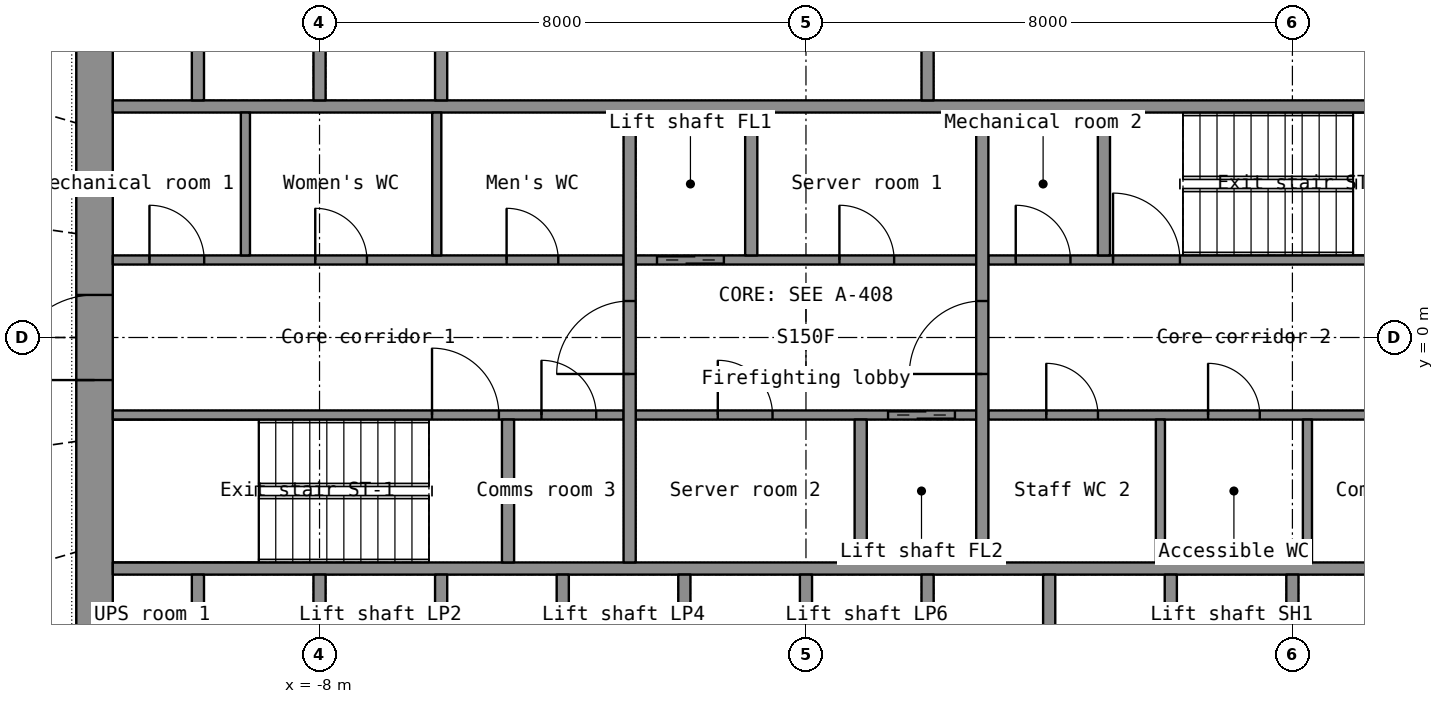
"""IFC4 building model, lengths in metres.
Left out: names, types, materials, properties, quantities, classifications, styles, units other than length and angle.
Written with IfcOpenShell. Run it as: python <this file> out.ifc"""

import sys

from ifc_helpers import new_model, si_unit, direction, frame, frame_2d, origin, place, context, subcontext, project, spatial, rectangle, extrude, element, fill, save


model = new_model("IFC4")
c1 = context("Model", 3, precision=1e-05, world=origin(), true_north=direction((0.0, 1.0)))
c2 = subcontext(c1, "Body", "Model", "MODEL_VIEW")
j1 = project(units=[si_unit("LENGTHUNIT", "METRE"), si_unit("PLANEANGLEUNIT", "RADIAN")], contexts=[c1])
p1 = place(None, origin())
s1 = spatial("IfcSite", under=j1, at=p1, CompositionType="ELEMENT")
p2 = place(p1, origin())
s2 = spatial("IfcBuilding", under=s1, at=p2, CompositionType="ELEMENT")
p3 = place(p2, frame((0.0, 0.0, 40.8)))
s3 = spatial("IfcBuildingStorey", under=s2, at=p3, CompositionType="ELEMENT", Elevation=40.8)
p4 = place(p3, frame((-11.7, -7.2, 0.0), z_axis=(0.0, 0.0, 1.0), x_axis=(0.0, 1.0, 0.0)))
e1 = element("IfcWall", 1, at=p4, inside=s3, PredefinedType="SHEAR", context=c2, shape_type="SweptSolid", body=[
    extrude(rectangle(XDim=14.4, YDim=0.6, at=frame_2d((7.2, 0.0))), origin(), (0.0, 0.0, 1.0), 3.3),
])
p5 = place(p4, frame((6.5, 0.0, 0.0)))
e2 = element("IfcOpeningElement", 2, at=p5, cuts=e1, PredefinedType="OPENING", context=c2, shape_type="SweptSolid", body=[
    extrude(rectangle(XDim=1.4, YDim=2.2, at=frame_2d((0.7, 1.1))), frame((0.0, 0.31, 0.0), z_axis=(0.0, -1.0, 0.0), x_axis=(1.0, 0.0, 0.0)), (0.0, 0.0, 1.0), 0.62),
])
for number, where, z_axis, x_axis in (
    (3, (-11.4, -3.8, 0.0), (0.0, 0.0, 1.0), (1.0, 0.0, 0.0)),
    (4, (-11.4, 3.8, 0.0), (0.0, 0.0, 1.0), (1.0, 0.0, 0.0)),
):
    element("IfcWall", number, at=place(p3, frame(where, z_axis=z_axis, x_axis=x_axis)), inside=s3, PredefinedType="SHEAR", context=c2, shape_type="SweptSolid", body=[
        extrude(rectangle(XDim=22.8, YDim=0.2, at=frame_2d((11.4, 0.0))), origin(), (0.0, 0.0, 1.0), 3.3),
    ])
for number, where, z_axis, x_axis in (
    (5, (-10.0, -6.6, 0.0), (0.0, 0.0, 1.0), (0.0, 1.0, 0.0)),
    (6, (-8.0, -6.6, 0.0), (0.0, 0.0, 1.0), (0.0, 1.0, 0.0)),
    (7, (-6.0, -6.6, 0.0), (0.0, 0.0, 1.0), (0.0, 1.0, 0.0)),
    (8, (-4.0, -6.6, 0.0), (0.0, 0.0, 1.0), (0.0, 1.0, 0.0)),
    (9, (-2.0, -6.6, 0.0), (0.0, 0.0, 1.0), (0.0, 1.0, 0.0)),
    (10, (0.0, -6.6, 0.0), (0.0, 0.0, 1.0), (0.0, 1.0, 0.0)),
    (11, (2.0, -6.6, 0.0), (0.0, 0.0, 1.0), (0.0, 1.0, 0.0)),
    (12, (4.0, -6.6, 0.0), (0.0, 0.0, 1.0), (0.0, 1.0, 0.0)),
    (13, (6.0, -6.6, 0.0), (0.0, 0.0, 1.0), (0.0, 1.0, 0.0)),
    (14, (8.0, -6.6, 0.0), (0.0, 0.0, 1.0), (0.0, 1.0, 0.0)),
    (15, (-10.0, 3.9, 0.0), (0.0, 0.0, 1.0), (0.0, 1.0, 0.0)),
    (16, (-8.0, 3.9, 0.0), (0.0, 0.0, 1.0), (0.0, 1.0, 0.0)),
    (17, (-6.0, 3.9, 0.0), (0.0, 0.0, 1.0), (0.0, 1.0, 0.0)),
):
    element("IfcWall", number, at=place(p3, frame(where, z_axis=z_axis, x_axis=x_axis)), inside=s3, PredefinedType="SHEAR", context=c2, shape_type="SweptSolid", body=[
        extrude(rectangle(XDim=2.7, YDim=0.2, at=frame_2d((1.35, 0.0))), origin(), (0.0, 0.0, 1.0), 3.3),
    ])
p6 = place(p3, frame((2.0, 3.9, 0.0), z_axis=(0.0, 0.0, 1.0), x_axis=(0.0, 1.0, 0.0)))
e18 = element("IfcWall", 18, at=p6, inside=s3, PredefinedType="PARTITIONING", context=c2, shape_type="SweptSolid", body=[
    extrude(rectangle(XDim=2.7, YDim=0.2, at=frame_2d((1.35, 0.0))), origin(), (0.0, 0.0, 1.0), 3.3),
])
p7 = place(p3, frame((-11.4, -1.275, 0.0), z_axis=(0.0, 0.0, 1.0), x_axis=(1.0, 0.0, 0.0)))
e19 = element("IfcWall", 19, at=p7, inside=s3, PredefinedType="SHEAR", context=c2, shape_type="SweptSolid", body=[
    extrude(rectangle(XDim=8.4, YDim=0.15, at=frame_2d((4.2, 0.0))), origin(), (0.0, 0.0, 1.0), 3.3),
])
p8 = place(p7, frame((5.25, 0.0, 0.0)))
e20 = element("IfcOpeningElement", 20, at=p8, cuts=e19, PredefinedType="OPENING", context=c2, shape_type="SweptSolid", body=[
    extrude(rectangle(XDim=1.1, YDim=2.15, at=frame_2d((0.55, 1.075))), frame((0.0, 0.085, 0.0), z_axis=(0.0, -1.0, 0.0), x_axis=(1.0, 0.0, 0.0)), (0.0, 0.0, 1.0), 0.17),
])
p9 = place(p7, frame((7.05, 0.0, 0.0)))
e21 = element("IfcOpeningElement", 21, at=p9, cuts=e19, PredefinedType="OPENING", context=c2, shape_type="SweptSolid", body=[
    extrude(rectangle(XDim=0.9, YDim=2.1, at=frame_2d((0.45, 1.05))), frame((0.0, 0.085, 0.0), z_axis=(0.0, -1.0, 0.0), x_axis=(1.0, 0.0, 0.0)), (0.0, 0.0, 1.0), 0.17),
])
p10 = place(p3, frame((-2.8, -1.275, 0.0), z_axis=(0.0, 0.0, 1.0), x_axis=(1.0, 0.0, 0.0)))
e22 = element("IfcWall", 22, at=p10, inside=s3, PredefinedType="SHEAR", context=c2, shape_type="SweptSolid", body=[
    extrude(rectangle(XDim=5.6, YDim=0.15, at=frame_2d((2.8, 0.0))), origin(), (0.0, 0.0, 1.0), 3.3),
])
p11 = place(p10, frame((4.15, 0.0, 0.0)))
e23 = element("IfcOpeningElement", 23, at=p11, cuts=e22, PredefinedType="OPENING", context=c2, shape_type="SweptSolid", body=[
    extrude(rectangle(XDim=1.1, YDim=2.2, at=frame_2d((0.55, 1.1))), frame((0.0, 0.085, 0.0), z_axis=(0.0, -1.0, 0.0), x_axis=(1.0, 0.0, 0.0)), (0.0, 0.0, 1.0), 0.17),
])
p12 = place(p10, frame((1.35, 0.0, 0.0)))
e24 = element("IfcOpeningElement", 24, at=p12, cuts=e22, PredefinedType="OPENING", context=c2, shape_type="SweptSolid", body=[
    extrude(rectangle(XDim=0.9, YDim=2.1, at=frame_2d((0.45, 1.05))), frame((0.0, 0.085, 0.0), z_axis=(0.0, -1.0, 0.0), x_axis=(1.0, 0.0, 0.0)), (0.0, 0.0, 1.0), 0.17),
])
p13 = place(p3, frame((3.0, -1.275, 0.0), z_axis=(0.0, 0.0, 1.0), x_axis=(1.0, 0.0, 0.0)))
e25 = element("IfcWall", 25, at=p13, inside=s3, PredefinedType="PARTITIONING", context=c2, shape_type="SweptSolid", body=[
    extrude(rectangle(XDim=8.4, YDim=0.15, at=frame_2d((4.2, 0.0))), origin(), (0.0, 0.0, 1.0), 3.3),
])
p14 = place(p13, frame((0.952, 0.0, 0.0)))
e26 = element("IfcOpeningElement", 26, at=p14, cuts=e25, PredefinedType="OPENING", context=c2, shape_type="SweptSolid", body=[
    extrude(rectangle(XDim=0.85, YDim=2.1, at=frame_2d((0.425, 1.05))), frame((0.0, 0.085, 0.0), z_axis=(0.0, -1.0, 0.0), x_axis=(1.0, 0.0, 0.0)), (0.0, 0.0, 1.0), 0.17),
])
p15 = place(p13, frame((3.613, 0.0, 0.0)))
e27 = element("IfcOpeningElement", 27, at=p15, cuts=e25, PredefinedType="OPENING", context=c2, shape_type="SweptSolid", body=[
    extrude(rectangle(XDim=0.85, YDim=2.1, at=frame_2d((0.425, 1.05))), frame((0.0, 0.085, 0.0), z_axis=(0.0, -1.0, 0.0), x_axis=(1.0, 0.0, 0.0)), (0.0, 0.0, 1.0), 0.17),
])
p16 = place(p13, frame((6.411, 0.0, 0.0)))
e28 = element("IfcOpeningElement", 28, at=p16, cuts=e25, PredefinedType="OPENING", context=c2, shape_type="SweptSolid", body=[
    extrude(rectangle(XDim=0.9, YDim=2.1, at=frame_2d((0.45, 1.05))), frame((0.0, 0.085, 0.0), z_axis=(0.0, -1.0, 0.0), x_axis=(1.0, 0.0, 0.0)), (0.0, 0.0, 1.0), 0.17),
])
p17 = place(p3, frame((-11.4, 1.275, 0.0), z_axis=(0.0, 0.0, 1.0), x_axis=(1.0, 0.0, 0.0)))
e29 = element("IfcWall", 29, at=p17, inside=s3, PredefinedType="PARTITIONING", context=c2, shape_type="SweptSolid", body=[
    extrude(rectangle(XDim=8.4, YDim=0.15, at=frame_2d((4.2, 0.0))), origin(), (0.0, 0.0, 1.0), 3.3),
])
p18 = place(p17, frame((0.603, 0.0, 0.0)))
e30 = element("IfcOpeningElement", 30, at=p18, cuts=e29, PredefinedType="OPENING", context=c2, shape_type="SweptSolid", body=[
    extrude(rectangle(XDim=0.9, YDim=2.1, at=frame_2d((0.45, 1.05))), frame((0.0, 0.085, 0.0), z_axis=(0.0, -1.0, 0.0), x_axis=(1.0, 0.0, 0.0)), (0.0, 0.0, 1.0), 0.17),
])
p19 = place(p17, frame((3.33, 0.0, 0.0)))
e31 = element("IfcOpeningElement", 31, at=p19, cuts=e29, PredefinedType="OPENING", context=c2, shape_type="SweptSolid", body=[
    extrude(rectangle(XDim=0.85, YDim=2.1, at=frame_2d((0.425, 1.05))), frame((0.0, 0.085, 0.0), z_axis=(0.0, -1.0, 0.0), x_axis=(1.0, 0.0, 0.0)), (0.0, 0.0, 1.0), 0.17),
])
p20 = place(p17, frame((6.477, 0.0, 0.0)))
e32 = element("IfcOpeningElement", 32, at=p20, cuts=e29, PredefinedType="OPENING", context=c2, shape_type="SweptSolid", body=[
    extrude(rectangle(XDim=0.85, YDim=2.1, at=frame_2d((0.425, 1.05))), frame((0.0, 0.085, 0.0), z_axis=(0.0, -1.0, 0.0), x_axis=(1.0, 0.0, 0.0)), (0.0, 0.0, 1.0), 0.17),
])
p21 = place(p3, frame((-2.8, 1.275, 0.0), z_axis=(0.0, 0.0, 1.0), x_axis=(1.0, 0.0, 0.0)))
e33 = element("IfcWall", 33, at=p21, inside=s3, PredefinedType="SHEAR", context=c2, shape_type="SweptSolid", body=[
    extrude(rectangle(XDim=5.6, YDim=0.15, at=frame_2d((2.8, 0.0))), origin(), (0.0, 0.0, 1.0), 3.3),
])
p22 = place(p21, frame((0.35, 0.0, 0.0)))
e34 = element("IfcOpeningElement", 34, at=p22, cuts=e33, PredefinedType="OPENING", context=c2, shape_type="SweptSolid", body=[
    extrude(rectangle(XDim=1.1, YDim=2.2, at=frame_2d((0.55, 1.1))), frame((0.0, 0.085, 0.0), z_axis=(0.0, -1.0, 0.0), x_axis=(1.0, 0.0, 0.0)), (0.0, 0.0, 1.0), 0.17),
])
p23 = place(p21, frame((3.35, 0.0, 0.0)))
e35 = element("IfcOpeningElement", 35, at=p23, cuts=e33, PredefinedType="OPENING", context=c2, shape_type="SweptSolid", body=[
    extrude(rectangle(XDim=0.9, YDim=2.1, at=frame_2d((0.45, 1.05))), frame((0.0, 0.085, 0.0), z_axis=(0.0, -1.0, 0.0), x_axis=(1.0, 0.0, 0.0)), (0.0, 0.0, 1.0), 0.17),
])
p24 = place(p3, frame((3.0, 1.275, 0.0), z_axis=(0.0, 0.0, 1.0), x_axis=(1.0, 0.0, 0.0)))
e36 = element("IfcWall", 36, at=p24, inside=s3, PredefinedType="SHEAR", context=c2, shape_type="SweptSolid", body=[
    extrude(rectangle(XDim=8.4, YDim=0.15, at=frame_2d((4.2, 0.0))), origin(), (0.0, 0.0, 1.0), 3.3),
])
p25 = place(p24, frame((2.05, 0.0, 0.0)))
e37 = element("IfcOpeningElement", 37, at=p25, cuts=e36, PredefinedType="OPENING", context=c2, shape_type="SweptSolid", body=[
    extrude(rectangle(XDim=1.1, YDim=2.15, at=frame_2d((0.55, 1.075))), frame((0.0, 0.085, 0.0), z_axis=(0.0, -1.0, 0.0), x_axis=(1.0, 0.0, 0.0)), (0.0, 0.0, 1.0), 0.17),
])
p26 = place(p24, frame((0.45, 0.0, 0.0)))
e38 = element("IfcOpeningElement", 38, at=p26, cuts=e36, PredefinedType="OPENING", context=c2, shape_type="SweptSolid", body=[
    extrude(rectangle(XDim=0.9, YDim=2.1, at=frame_2d((0.45, 1.05))), frame((0.0, 0.085, 0.0), z_axis=(0.0, -1.0, 0.0), x_axis=(1.0, 0.0, 0.0)), (0.0, 0.0, 1.0), 0.17),
])
p27 = place(p3, frame((-2.9, -3.7, 0.0), z_axis=(0.0, 0.0, 1.0), x_axis=(0.0, 1.0, 0.0)))
e39 = element("IfcWall", 39, at=p27, inside=s3, PredefinedType="SHEAR", context=c2, shape_type="SweptSolid", body=[
    extrude(rectangle(XDim=7.4, YDim=0.2, at=frame_2d((3.7, 0.0))), origin(), (0.0, 0.0, 1.0), 3.3),
])
p28 = place(p27, frame((3.1, 0.0, 0.0)))
e40 = element("IfcOpeningElement", 40, at=p28, cuts=e39, PredefinedType="OPENING", context=c2, shape_type="SweptSolid", body=[
    extrude(rectangle(XDim=1.2, YDim=2.2, at=frame_2d((0.6, 1.1))), frame((0.0, 0.11, 0.0), z_axis=(0.0, -1.0, 0.0), x_axis=(1.0, 0.0, 0.0)), (0.0, 0.0, 1.0), 0.22),
])
p29 = place(p3, frame((2.9, -3.7, 0.0), z_axis=(0.0, 0.0, 1.0), x_axis=(0.0, 1.0, 0.0)))
e41 = element("IfcWall", 41, at=p29, inside=s3, PredefinedType="SHEAR", context=c2, shape_type="SweptSolid", body=[
    extrude(rectangle(XDim=7.4, YDim=0.2, at=frame_2d((3.7, 0.0))), origin(), (0.0, 0.0, 1.0), 3.3),
])
p30 = place(p29, frame((3.1, 0.0, 0.0)))
e42 = element("IfcOpeningElement", 42, at=p30, cuts=e41, PredefinedType="OPENING", context=c2, shape_type="SweptSolid", body=[
    extrude(rectangle(XDim=1.2, YDim=2.2, at=frame_2d((0.6, 1.1))), frame((0.0, 0.11, 0.0), z_axis=(0.0, -1.0, 0.0), x_axis=(1.0, 0.0, 0.0)), (0.0, 0.0, 1.0), 0.22),
])
for number, where, z_axis, x_axis in (
    (43, (-0.9, 1.35, 0.0), (0.0, 0.0, 1.0), (0.0, 1.0, 0.0)),
    (44, (0.9, -3.7, 0.0), (0.0, 0.0, 1.0), (0.0, 1.0, 0.0)),
    (45, (-4.9, -3.7, 0.0), (0.0, 0.0, 1.0), (0.0, 1.0, 0.0)),
    (46, (4.9, 1.35, 0.0), (0.0, 0.0, 1.0), (0.0, 1.0, 0.0)),
):
    element("IfcWall", number, at=place(p3, frame(where, z_axis=z_axis, x_axis=x_axis)), inside=s3, PredefinedType="SHEAR", context=c2, shape_type="SweptSolid", body=[
        extrude(rectangle(XDim=2.35, YDim=0.2, at=frame_2d((1.175, 0.0))), origin(), (0.0, 0.0, 1.0), 3.3),
    ])
for number, where, z_axis, x_axis in (
    (47, (-9.219, 1.35, 0.0), (0.0, 0.0, 1.0), (0.0, 1.0, 0.0)),
    (48, (-6.072, 1.35, 0.0), (0.0, 0.0, 1.0), (0.0, 1.0, 0.0)),
    (49, (5.829, -3.7, 0.0), (0.0, 0.0, 1.0), (0.0, 1.0, 0.0)),
    (50, (8.247, -3.7, 0.0), (0.0, 0.0, 1.0), (0.0, 1.0, 0.0)),
):
    element("IfcWall", number, at=place(p3, frame(where, z_axis=z_axis, x_axis=x_axis)), inside=s3, PredefinedType="PARTITIONING", context=c2, shape_type="SweptSolid", body=[
        extrude(rectangle(XDim=2.35, YDim=0.15, at=frame_2d((1.175, 0.0))), origin(), (0.0, 0.0, 1.0), 3.3),
    ])
p31 = place(p5, origin())
e51 = element("IfcDoor", 51, at=p31, inside=s3, OperationType="DOUBLE_DOOR_SINGLE_SWING", PredefinedType="DOOR", context=c2, shape_type="SweptSolid", body=[
    extrude(rectangle(XDim=1.4, YDim=2.2, at=frame_2d((0.7, 1.1))), frame((0.0, 0.025, 0.0), z_axis=(0.0, -1.0, 0.0), x_axis=(1.0, 0.0, 0.0)), (0.0, 0.0, 1.0), 0.05),
])
fill(e2, e51)
p32 = place(p28, origin())
e52 = element("IfcDoor", 52, at=p32, inside=s3, OperationType="SINGLE_SWING_LEFT", PredefinedType="DOOR", context=c2, shape_type="SweptSolid", body=[
    extrude(rectangle(XDim=1.2, YDim=2.2, at=frame_2d((0.6, 1.1))), frame((0.0, 0.025, 0.0), z_axis=(0.0, -1.0, 0.0), x_axis=(1.0, 0.0, 0.0)), (0.0, 0.0, 1.0), 0.05),
])
fill(e40, e52)
p33 = place(p30, origin())
e53 = element("IfcDoor", 53, at=p33, inside=s3, OperationType="SINGLE_SWING_LEFT", PredefinedType="DOOR", context=c2, shape_type="SweptSolid", body=[
    extrude(rectangle(XDim=1.2, YDim=2.2, at=frame_2d((0.6, 1.1))), frame((0.0, 0.025, 0.0), z_axis=(0.0, -1.0, 0.0), x_axis=(1.0, 0.0, 0.0)), (0.0, 0.0, 1.0), 0.05),
])
fill(e42, e53)
p34 = place(p22, origin())
e54 = element("IfcDoor", 54, at=p34, inside=s3, OperationType="DOUBLE_DOOR_SLIDING", PredefinedType="DOOR", context=c2, shape_type="SweptSolid", body=[
    extrude(rectangle(XDim=1.1, YDim=2.2, at=frame_2d((0.55, 1.1))), frame((0.0, 0.025, 0.0), z_axis=(0.0, -1.0, 0.0), x_axis=(1.0, 0.0, 0.0)), (0.0, 0.0, 1.0), 0.05),
])
fill(e34, e54)
p35 = place(p11, origin())
e55 = element("IfcDoor", 55, at=p35, inside=s3, OperationType="DOUBLE_DOOR_SLIDING", PredefinedType="DOOR", context=c2, shape_type="SweptSolid", body=[
    extrude(rectangle(XDim=1.1, YDim=2.2, at=frame_2d((0.55, 1.1))), frame((0.0, 0.025, 0.0), z_axis=(0.0, -1.0, 0.0), x_axis=(1.0, 0.0, 0.0)), (0.0, 0.0, 1.0), 0.05),
])
fill(e23, e55)
p36 = place(p8, origin())
e56 = element("IfcDoor", 56, at=p36, inside=s3, OperationType="SINGLE_SWING_LEFT", PredefinedType="DOOR", context=c2, shape_type="SweptSolid", body=[
    extrude(rectangle(XDim=1.1, YDim=2.15, at=frame_2d((0.55, 1.075))), frame((0.0, 0.025, 0.0), z_axis=(0.0, -1.0, 0.0), x_axis=(1.0, 0.0, 0.0)), (0.0, 0.0, 1.0), 0.05),
])
fill(e20, e56)
p37 = place(p25, origin())
e57 = element("IfcDoor", 57, at=p37, inside=s3, OperationType="SINGLE_SWING_LEFT", PredefinedType="DOOR", context=c2, shape_type="SweptSolid", body=[
    extrude(rectangle(XDim=1.1, YDim=2.15, at=frame_2d((0.55, 1.075))), frame((0.0, 0.025, 0.0), z_axis=(0.0, -1.0, 0.0), x_axis=(1.0, 0.0, 0.0)), (0.0, 0.0, 1.0), 0.05),
])
fill(e37, e57)
p38 = place(p18, origin())
e58 = element("IfcDoor", 58, at=p38, inside=s3, OperationType="SINGLE_SWING_LEFT", PredefinedType="DOOR", context=c2, shape_type="SweptSolid", body=[
    extrude(rectangle(XDim=0.9, YDim=2.1, at=frame_2d((0.45, 1.05))), frame((0.0, 0.025, 0.0), z_axis=(0.0, -1.0, 0.0), x_axis=(1.0, 0.0, 0.0)), (0.0, 0.0, 1.0), 0.05),
])
fill(e30, e58)
p39 = place(p19, origin())
e59 = element("IfcDoor", 59, at=p39, inside=s3, OperationType="SINGLE_SWING_LEFT", PredefinedType="DOOR", context=c2, shape_type="SweptSolid", body=[
    extrude(rectangle(XDim=0.85, YDim=2.1, at=frame_2d((0.425, 1.05))), frame((0.0, 0.025, 0.0), z_axis=(0.0, -1.0, 0.0), x_axis=(1.0, 0.0, 0.0)), (0.0, 0.0, 1.0), 0.05),
])
fill(e31, e59)
p40 = place(p20, origin())
e60 = element("IfcDoor", 60, at=p40, inside=s3, OperationType="SINGLE_SWING_LEFT", PredefinedType="DOOR", context=c2, shape_type="SweptSolid", body=[
    extrude(rectangle(XDim=0.85, YDim=2.1, at=frame_2d((0.425, 1.05))), frame((0.0, 0.025, 0.0), z_axis=(0.0, -1.0, 0.0), x_axis=(1.0, 0.0, 0.0)), (0.0, 0.0, 1.0), 0.05),
])
fill(e32, e60)
p41 = place(p14, origin())
e61 = element("IfcDoor", 61, at=p41, inside=s3, OperationType="SINGLE_SWING_LEFT", PredefinedType="DOOR", context=c2, shape_type="SweptSolid", body=[
    extrude(rectangle(XDim=0.85, YDim=2.1, at=frame_2d((0.425, 1.05))), frame((0.0, 0.025, 0.0), z_axis=(0.0, -1.0, 0.0), x_axis=(1.0, 0.0, 0.0)), (0.0, 0.0, 1.0), 0.05),
])
fill(e26, e61)
p42 = place(p15, origin())
e62 = element("IfcDoor", 62, at=p42, inside=s3, OperationType="SINGLE_SWING_LEFT", PredefinedType="DOOR", context=c2, shape_type="SweptSolid", body=[
    extrude(rectangle(XDim=0.85, YDim=2.1, at=frame_2d((0.425, 1.05))), frame((0.0, 0.025, 0.0), z_axis=(0.0, -1.0, 0.0), x_axis=(1.0, 0.0, 0.0)), (0.0, 0.0, 1.0), 0.05),
])
fill(e27, e62)
p43 = place(p23, origin())
e63 = element("IfcDoor", 63, at=p43, inside=s3, OperationType="SINGLE_SWING_LEFT", PredefinedType="DOOR", context=c2, shape_type="SweptSolid", body=[
    extrude(rectangle(XDim=0.9, YDim=2.1, at=frame_2d((0.45, 1.05))), frame((0.0, 0.025, 0.0), z_axis=(0.0, -1.0, 0.0), x_axis=(1.0, 0.0, 0.0)), (0.0, 0.0, 1.0), 0.05),
])
fill(e35, e63)
p44 = place(p12, origin())
e64 = element("IfcDoor", 64, at=p44, inside=s3, OperationType="SINGLE_SWING_LEFT", PredefinedType="DOOR", context=c2, shape_type="SweptSolid", body=[
    extrude(rectangle(XDim=0.9, YDim=2.1, at=frame_2d((0.45, 1.05))), frame((0.0, 0.025, 0.0), z_axis=(0.0, -1.0, 0.0), x_axis=(1.0, 0.0, 0.0)), (0.0, 0.0, 1.0), 0.05),
])
fill(e24, e64)
p45 = place(p26, origin())
e65 = element("IfcDoor", 65, at=p45, inside=s3, OperationType="SINGLE_SWING_LEFT", PredefinedType="DOOR", context=c2, shape_type="SweptSolid", body=[
    extrude(rectangle(XDim=0.9, YDim=2.1, at=frame_2d((0.45, 1.05))), frame((0.0, 0.025, 0.0), z_axis=(0.0, -1.0, 0.0), x_axis=(1.0, 0.0, 0.0)), (0.0, 0.0, 1.0), 0.05),
])
fill(e38, e65)
p46 = place(p9, origin())
e66 = element("IfcDoor", 66, at=p46, inside=s3, OperationType="SINGLE_SWING_LEFT", PredefinedType="DOOR", context=c2, shape_type="SweptSolid", body=[
    extrude(rectangle(XDim=0.9, YDim=2.1, at=frame_2d((0.45, 1.05))), frame((0.0, 0.025, 0.0), z_axis=(0.0, -1.0, 0.0), x_axis=(1.0, 0.0, 0.0)), (0.0, 0.0, 1.0), 0.05),
])
fill(e21, e66)
save(model, sys.argv[1])
